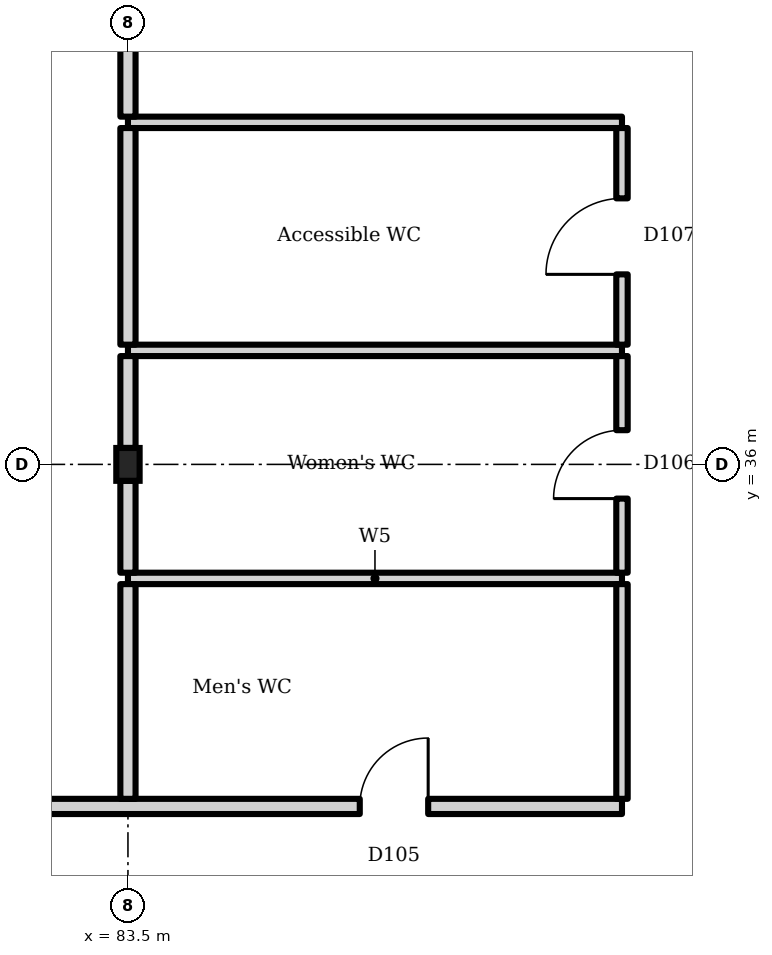
"""IFC4 building model, lengths in metres.
Left out: names, types, materials, properties, quantities, classifications, styles, units other than length and angle.
Written with IfcOpenShell. Run it as: python <this file> out.ifc"""

import sys

from ifc_helpers import new_model, si_unit, direction, frame, frame_2d, origin, origin_2d, place, context, subcontext, project, spatial, rectangle, i_section, extrude, element, fill, save


model = new_model("IFC4")
c1 = context("Model", 3, precision=1e-05, world=origin(), true_north=direction((0.0, 1.0)))
c2 = subcontext(c1, "Body", "Model", "MODEL_VIEW")
j1 = project(units=[si_unit("LENGTHUNIT", "METRE"), si_unit("PLANEANGLEUNIT", "RADIAN")], contexts=[c1])
p1 = place(None, origin())
s1 = spatial("IfcSite", under=j1, at=p1, CompositionType="ELEMENT")
p2 = place(p1, origin())
s2 = spatial("IfcBuilding", under=s1, at=p2, CompositionType="ELEMENT")
p3 = place(p2, frame((0.0, 0.0, 5.4)))
s3 = spatial("IfcBuildingStorey", under=s2, at=p3, CompositionType="ELEMENT", Elevation=5.4)
p4 = place(p3, frame((83.5, 36.0, 0.0), z_axis=(0.0, 0.0, 1.0), x_axis=(1.0, 0.0, 0.0)))
e1 = element("IfcColumn", 1, at=p4, inside=s3, PredefinedType="COLUMN", context=c2, shape_type="SweptSolid", body=[
    extrude(i_section(OverallWidth=0.307, OverallDepth=0.432, WebThickness=0.021, FlangeThickness=0.04, FilletRadius=0.027, at=origin_2d()), origin(), (0.0, 0.0, 1.0), 4.5),
])
p5 = place(p3, frame((74.5, 31.5, 0.0), z_axis=(0.0, 0.0, 1.0), x_axis=(1.0, 0.0, 0.0)))
e2 = element("IfcWall", 2, at=p5, inside=s3, PredefinedType="SOLIDWALL", context=c2, shape_type="SweptSolid", body=[
    extrude(rectangle(XDim=15.5, YDim=0.2, at=frame_2d((7.75, 0.0))), origin(), (0.0, 0.0, 1.0), 3.6),
])
p6 = place(p5, frame((4.0, 0.0, 0.0)))
e3 = element("IfcOpeningElement", 3, at=p6, cuts=e2, PredefinedType="OPENING", context=c2, shape_type="SweptSolid", body=[
    extrude(rectangle(XDim=1.0, YDim=2.1, at=frame_2d((0.5, 1.05))), frame((0.0, 0.11, 0.0), z_axis=(0.0, -1.0, 0.0), x_axis=(1.0, 0.0, 0.0)), (0.0, 0.0, 1.0), 0.22),
])
p7 = place(p5, frame((12.05, 0.0, 0.0)))
e4 = element("IfcOpeningElement", 4, at=p7, cuts=e2, PredefinedType="OPENING", context=c2, shape_type="SweptSolid", body=[
    extrude(rectangle(XDim=0.9, YDim=2.1, at=frame_2d((0.45, 1.05))), frame((0.0, 0.11, 0.0), z_axis=(0.0, -1.0, 0.0), x_axis=(1.0, 0.0, 0.0)), (0.0, 0.0, 1.0), 0.22),
])
for number, where, z_axis, x_axis in (
    (5, (83.5, 34.5, 0.0), (0.0, 0.0, 1.0), (1.0, 0.0, 0.0)),
    (6, (83.5, 37.5, 0.0), (0.0, 0.0, 1.0), (1.0, 0.0, 0.0)),
    (7, (83.5, 40.5, 0.0), (0.0, 0.0, 1.0), (1.0, 0.0, 0.0)),
):
    element("IfcWall", number, at=place(p3, frame(where, z_axis=z_axis, x_axis=x_axis)), inside=s3, PredefinedType="PARTITIONING", context=c2, shape_type="SweptSolid", body=[
        extrude(rectangle(XDim=6.5, YDim=0.15, at=frame_2d((3.25, 0.0))), origin(), (0.0, 0.0, 1.0), 3.6),
    ])
p8 = place(p3, frame((83.5, 31.6, 0.0), z_axis=(0.0, 0.0, 1.0), x_axis=(0.0, 1.0, 0.0)))
e8 = element("IfcWall", 8, at=p8, inside=s3, PredefinedType="SOLIDWALL", context=c2, shape_type="SweptSolid", body=[
    extrude(rectangle(XDim=2.825, YDim=0.2, at=frame_2d((1.413, 0.0))), origin(), (0.0, 0.0, 1.0), 3.6),
])
for number, where, z_axis, x_axis in (
    (9, (83.5, 34.575, 0.0), (0.0, 0.0, 1.0), (0.0, 1.0, 0.0)),
    (10, (83.5, 36.216, 0.0), (0.0, 0.0, 1.0), (0.0, 1.0, 0.0)),
):
    element("IfcWall", number, at=place(p3, frame(where, z_axis=z_axis, x_axis=x_axis)), inside=s3, PredefinedType="SOLIDWALL", context=c2, shape_type="SweptSolid", body=[
        extrude(rectangle(XDim=1.209, YDim=0.2, at=frame_2d((0.604, 0.0))), origin(), (0.0, 0.0, 1.0), 3.6),
    ])
p9 = place(p3, frame((83.5, 37.575, 0.0), z_axis=(0.0, 0.0, 1.0), x_axis=(0.0, 1.0, 0.0)))
e11 = element("IfcWall", 11, at=p9, inside=s3, PredefinedType="SOLIDWALL", context=c2, shape_type="SweptSolid", body=[
    extrude(rectangle(XDim=2.85, YDim=0.2, at=frame_2d((1.425, 0.0))), origin(), (0.0, 0.0, 1.0), 3.6),
])
p10 = place(p3, frame((83.5, 40.575, 0.0), z_axis=(0.0, 0.0, 1.0), x_axis=(0.0, 1.0, 0.0)))
e12 = element("IfcWall", 12, at=p10, inside=s3, PredefinedType="SOLIDWALL", context=c2, shape_type="SweptSolid", body=[
    extrude(rectangle(XDim=4.075, YDim=0.2, at=frame_2d((2.038, 0.0))), origin(), (0.0, 0.0, 1.0), 3.6),
])
p11 = place(p3, frame((90.0, 31.6, 0.0), z_axis=(0.0, 0.0, 1.0), x_axis=(0.0, 1.0, 0.0)))
e13 = element("IfcWall", 13, at=p11, inside=s3, PredefinedType="PARTITIONING", context=c2, shape_type="SweptSolid", body=[
    extrude(rectangle(XDim=2.825, YDim=0.15, at=frame_2d((1.413, 0.0))), origin(), (0.0, 0.0, 1.0), 3.6),
])
p12 = place(p3, frame((90.0, 34.575, 0.0), z_axis=(0.0, 0.0, 1.0), x_axis=(0.0, 1.0, 0.0)))
e14 = element("IfcWall", 14, at=p12, inside=s3, PredefinedType="PARTITIONING", context=c2, shape_type="SweptSolid", body=[
    extrude(rectangle(XDim=2.85, YDim=0.15, at=frame_2d((1.425, 0.0))), origin(), (0.0, 0.0, 1.0), 3.6),
])
p13 = place(p12, frame((0.975, 0.0, 0.0)))
e15 = element("IfcOpeningElement", 15, at=p13, cuts=e14, PredefinedType="OPENING", context=c2, shape_type="SweptSolid", body=[
    extrude(rectangle(XDim=0.9, YDim=2.1, at=frame_2d((0.45, 1.05))), frame((0.0, 0.085, 0.0), z_axis=(0.0, -1.0, 0.0), x_axis=(1.0, 0.0, 0.0)), (0.0, 0.0, 1.0), 0.17),
])
p14 = place(p3, frame((90.0, 37.575, 0.0), z_axis=(0.0, 0.0, 1.0), x_axis=(0.0, 1.0, 0.0)))
e16 = element("IfcWall", 16, at=p14, inside=s3, PredefinedType="PARTITIONING", context=c2, shape_type="SweptSolid", body=[
    extrude(rectangle(XDim=2.85, YDim=0.15, at=frame_2d((1.425, 0.0))), origin(), (0.0, 0.0, 1.0), 3.6),
])
p15 = place(p14, frame((0.925, 0.0, 0.0)))
e17 = element("IfcOpeningElement", 17, at=p15, cuts=e16, PredefinedType="OPENING", context=c2, shape_type="SweptSolid", body=[
    extrude(rectangle(XDim=1.0, YDim=2.1, at=frame_2d((0.5, 1.05))), frame((0.0, 0.085, 0.0), z_axis=(0.0, -1.0, 0.0), x_axis=(1.0, 0.0, 0.0)), (0.0, 0.0, 1.0), 0.17),
])
p16 = place(p7, origin())
e18 = element("IfcDoor", 18, at=p16, inside=s3, OperationType="SINGLE_SWING_LEFT", PredefinedType="DOOR", context=c2, shape_type="SweptSolid", body=[
    extrude(rectangle(XDim=0.9, YDim=2.1, at=frame_2d((0.45, 1.05))), frame((0.0, 0.025, 0.0), z_axis=(0.0, -1.0, 0.0), x_axis=(1.0, 0.0, 0.0)), (0.0, 0.0, 1.0), 0.05),
])
fill(e4, e18)
p17 = place(p13, origin())
e19 = element("IfcDoor", 19, at=p17, inside=s3, OperationType="SINGLE_SWING_RIGHT", PredefinedType="DOOR", context=c2, shape_type="SweptSolid", body=[
    extrude(rectangle(XDim=0.9, YDim=2.1, at=frame_2d((0.45, 1.05))), frame((0.0, 0.025, 0.0), z_axis=(0.0, -1.0, 0.0), x_axis=(1.0, 0.0, 0.0)), (0.0, 0.0, 1.0), 0.05),
])
fill(e15, e19)
p18 = place(p15, origin())
e20 = element("IfcDoor", 20, at=p18, inside=s3, OperationType="SINGLE_SWING_RIGHT", PredefinedType="DOOR", context=c2, shape_type="SweptSolid", body=[
    extrude(rectangle(XDim=1.0, YDim=2.1, at=frame_2d((0.5, 1.05))), frame((0.0, 0.025, 0.0), z_axis=(0.0, -1.0, 0.0), x_axis=(1.0, 0.0, 0.0)), (0.0, 0.0, 1.0), 0.05),
])
fill(e17, e20)
save(model, sys.argv[1])
